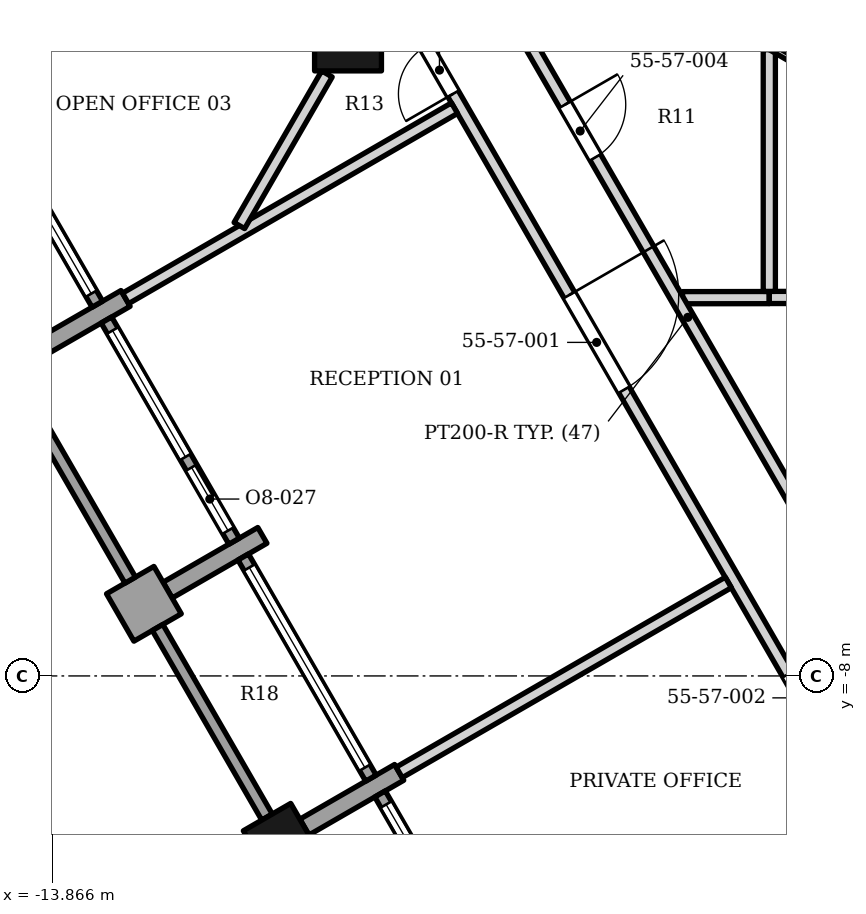
"""IFC4 building model, lengths in metres.
Left out: names, types, materials, properties, quantities, classifications, styles, units other than length and angle.
Written with IfcOpenShell. Run it as: python <this file> out.ifc"""

import sys

from ifc_helpers import new_model, si_unit, direction, frame, frame_2d, origin, origin_2d, place, context, subcontext, project, spatial, rectangle, extrude, element, fill, save


model = new_model("IFC4")
c1 = context("Model", 3, precision=1e-05, world=origin(), true_north=direction((0.0, 1.0)))
c2 = subcontext(c1, "Body", "Model", "MODEL_VIEW")
j1 = project(units=[si_unit("LENGTHUNIT", "METRE"), si_unit("PLANEANGLEUNIT", "RADIAN")], contexts=[c1])
p1 = place(None, origin())
s1 = spatial("IfcSite", under=j1, at=p1, CompositionType="ELEMENT")
p2 = place(p1, origin())
s2 = spatial("IfcBuilding", under=s1, at=p2, CompositionType="ELEMENT")
p3 = place(p2, frame((0.0, 0.0, 231.5)))
s3 = spatial("IfcBuildingStorey", under=s2, at=p3, CompositionType="ELEMENT", Elevation=231.5)
p4 = place(p3, frame((-9.0, 2.5, 0.0), z_axis=(0.0, 0.0, 1.0), x_axis=(1.0, 0.0, 0.0)))
e1 = element("IfcColumn", 1, at=p4, inside=s3, PredefinedType="COLUMN", context=c2, shape_type="SweptSolid", body=[
    extrude(rectangle(XDim=1.1, YDim=1.1, at=origin_2d()), origin(), (0.0, 0.0, 1.0), 3.9),
])
p5 = place(p3, frame((-10.107, -10.711, 0.0), z_axis=(0.0, 0.0, 1.0), x_axis=(0.5, -0.866025403784, 0.0)))
e2 = element("IfcColumn", 2, at=p5, inside=s3, PredefinedType="COLUMN", context=c2, shape_type="SweptSolid", body=[
    extrude(rectangle(XDim=0.9, YDim=0.9, at=origin_2d()), origin(), (0.0, 0.0, 1.0), 3.9),
])
p6 = place(p3, frame((-14.217, -2.692, 0.0), z_axis=(0.0, 0.0, 1.0), x_axis=(0.866047807691, 0.499961193289, 0.0)))
e3 = element("IfcWall", 3, at=p6, inside=s3, PredefinedType="SOLIDWALL", context=c2, shape_type="SweptSolid", body=[
    extrude(rectangle(XDim=1.8, YDim=0.3, at=frame_2d((0.9, 0.0))), origin(), (0.0, 0.0, 1.0), 3.0),
])
p7 = place(p3, frame((-12.582, -6.424, 0.0), z_axis=(0.0, 0.0, 1.0), x_axis=(0.499902469156, -0.866081705922, 0.0)))
e4 = element("IfcWall", 4, at=p7, inside=s3, PredefinedType="SOLIDWALL", context=c2, shape_type="SweptSolid", body=[
    extrude(rectangle(XDim=0.9, YDim=0.9, at=frame_2d((0.45, 0.0))), origin(), (0.0, 0.0, 1.0), 3.0),
])
p8 = place(p3, frame((-11.967, -6.589, 0.0), z_axis=(0.0, 0.0, 1.0), x_axis=(0.865989075817, 0.500062916607, 0.0)))
e5 = element("IfcWall", 5, at=p8, inside=s3, PredefinedType="SOLIDWALL", context=c2, shape_type="SweptSolid", body=[
    extrude(rectangle(XDim=1.8, YDim=0.3, at=frame_2d((0.9, 0.0))), origin(), (0.0, 0.0, 1.0), 2.974),
])
p9 = place(p3, frame((-9.717, -10.486, 0.0), z_axis=(0.0, 0.0, 1.0), x_axis=(0.866047807691, 0.499961193289, 0.0)))
e6 = element("IfcWall", 6, at=p9, inside=s3, PredefinedType="SOLIDWALL", context=c2, shape_type="SweptSolid", body=[
    extrude(rectangle(XDim=1.8, YDim=0.3, at=frame_2d((0.9, 0.0))), origin(), (0.0, 0.0, 1.0), 2.884),
])
p10 = place(p3, frame((-15.223, 1.75, 0.0), z_axis=(0.0, 0.0, 1.0), x_axis=(0.500027713859, -0.866009402589, 0.0)))
e7 = element("IfcWall", 7, at=p10, inside=s3, PredefinedType="ELEMENTEDWALL", context=c2, shape_type="SweptSolid", body=[
    extrude(rectangle(XDim=4.2, YDim=0.2, at=frame_2d((2.1, 0.0))), origin(), (0.0, 0.0, 1.0), 3.0),
])
p11 = place(p10, frame((0.2, 0.0, 0.45)))
e8 = element("IfcOpeningElement", 8, at=p11, cuts=e7, PredefinedType="OPENING", context=c2, shape_type="SweptSolid", body=[
    extrude(rectangle(XDim=3.8, YDim=2.25, at=frame_2d((1.9, 1.125))), frame((0.0, 0.11, 0.0), z_axis=(0.0, -1.0, 0.0), x_axis=(1.0, 0.0, 0.0)), (0.0, 0.0, 1.0), 0.22),
])
p12 = place(p3, frame((-14.382, -3.306, 0.0), z_axis=(0.0, 0.0, 1.0), x_axis=(0.500012057535, -0.866018442252, 0.0)))
e9 = element("IfcWall", 9, at=p12, inside=s3, PredefinedType="SOLIDWALL", context=c2, shape_type="SweptSolid", body=[
    extrude(rectangle(XDim=3.6, YDim=0.2, at=frame_2d((1.8, 0.0))), origin(), (0.0, 0.0, 1.0), 3.0),
])
p13 = place(p3, frame((-12.973, -2.146, 0.0), z_axis=(0.0, 0.0, 1.0), x_axis=(0.500002543286, -0.866023935413, 0.0)))
e10 = element("IfcWall", 10, at=p13, inside=s3, PredefinedType="ELEMENTEDWALL", context=c2, shape_type="SweptSolid", body=[
    extrude(rectangle(XDim=4.2, YDim=0.2, at=frame_2d((2.1, 0.0))), origin(), (0.0, 0.0, 1.0), 2.974),
])
p14 = place(p13, frame((0.2, 0.0, 0.45)))
e11 = element("IfcOpeningElement", 11, at=p14, cuts=e10, PredefinedType="OPENING", context=c2, shape_type="SweptSolid", body=[
    extrude(rectangle(XDim=2.4, YDim=2.25, at=frame_2d((1.2, 1.125))), frame((0.0, 0.11, 0.0), z_axis=(0.0, -1.0, 0.0), x_axis=(1.0, 0.0, 0.0)), (0.0, 0.0, 1.0), 0.22),
])
p15 = place(p13, frame((2.8, 0.0, 0.0)))
e12 = element("IfcOpeningElement", 12, at=p15, cuts=e10, PredefinedType="OPENING", context=c2, shape_type="SweptSolid", body=[
    extrude(rectangle(XDim=1.2, YDim=2.7, at=frame_2d((0.6, 1.35))), frame((0.0, 0.11, 0.0), z_axis=(0.0, -1.0, 0.0), x_axis=(1.0, 0.0, 0.0)), (0.0, 0.0, 1.0), 0.22),
])
p16 = place(p3, frame((-12.132, -7.204, 0.0), z_axis=(0.0, 0.0, 1.0), x_axis=(0.500012057535, -0.866018442252, 0.0)))
e13 = element("IfcWall", 13, at=p16, inside=s3, PredefinedType="SOLIDWALL", context=c2, shape_type="SweptSolid", body=[
    extrude(rectangle(XDim=3.6, YDim=0.2, at=frame_2d((1.8, 0.0))), origin(), (0.0, 0.0, 1.0), 3.0),
])
p17 = place(p3, frame((-10.723, -6.044, 0.0), z_axis=(0.0, 0.0, 1.0), x_axis=(0.500027713859, -0.866009402589, 0.0)))
e14 = element("IfcWall", 14, at=p17, inside=s3, PredefinedType="ELEMENTEDWALL", context=c2, shape_type="SweptSolid", body=[
    extrude(rectangle(XDim=4.2, YDim=0.2, at=frame_2d((2.1, 0.0))), origin(), (0.0, 0.0, 1.0), 2.884),
])
p18 = place(p17, frame((0.2, 0.0, 0.45)))
e15 = element("IfcOpeningElement", 15, at=p18, cuts=e14, PredefinedType="OPENING", context=c2, shape_type="SweptSolid", body=[
    extrude(rectangle(XDim=3.8, YDim=2.25, at=frame_2d((1.9, 1.125))), frame((0.0, 0.11, 0.0), z_axis=(0.0, -1.0, 0.0), x_axis=(1.0, 0.0, 0.0)), (0.0, 0.0, 1.0), 0.22),
])
p19 = place(p3, frame((-8.473, -9.941, 0.0), z_axis=(0.0, 0.0, 1.0), x_axis=(0.500027713859, -0.866009402589, 0.0)))
e16 = element("IfcWall", 16, at=p19, inside=s3, PredefinedType="ELEMENTEDWALL", context=c2, shape_type="SweptSolid", body=[
    extrude(rectangle(XDim=4.2, YDim=0.2, at=frame_2d((2.1, 0.0))), origin(), (0.0, 0.0, 1.0), 2.95),
])
p20 = place(p19, frame((0.2, 0.0, 0.45)))
e17 = element("IfcOpeningElement", 17, at=p20, cuts=e16, PredefinedType="OPENING", context=c2, shape_type="SweptSolid", body=[
    extrude(rectangle(XDim=2.4, YDim=2.25, at=frame_2d((1.2, 1.125))), frame((0.0, 0.11, 0.0), z_axis=(0.0, -1.0, 0.0), x_axis=(1.0, 0.0, 0.0)), (0.0, 0.0, 1.0), 0.22),
])
p21 = place(p19, frame((2.8, 0.0, 0.0)))
e18 = element("IfcOpeningElement", 18, at=p21, cuts=e16, PredefinedType="OPENING", context=c2, shape_type="SweptSolid", body=[
    extrude(rectangle(XDim=1.2, YDim=2.7, at=frame_2d((0.6, 1.35))), frame((0.0, 0.11, 0.0), z_axis=(0.0, -1.0, 0.0), x_axis=(1.0, 0.0, 0.0)), (0.0, 0.0, 1.0), 0.22),
])
p22 = place(p3, frame((-5.908, -13.483, 0.0), z_axis=(0.0, 0.0, 1.0), x_axis=(0.866160870949, 0.499765290549, 0.0)))
e19 = element("IfcWall", 19, at=p22, inside=s3, PredefinedType="PARTITIONING", context=c2, shape_type="SweptSolid", body=[
    extrude(rectangle(XDim=6.25, YDim=0.2, at=frame_2d((3.125, 0.0))), origin(), (0.0, 0.0, 1.0), 2.742),
])
p23 = place(p3, frame((-8.403, 3.534, 0.0), z_axis=(0.0, 0.0, 1.0), x_axis=(0.499994899308, -0.86602834865, 0.0)))
e20 = element("IfcWall", 20, at=p23, inside=s3, PredefinedType="PARTITIONING", context=c2, shape_type="SweptSolid", body=[
    extrude(rectangle(XDim=16.677, YDim=0.2, at=frame_2d((8.339, 0.0))), origin(), (0.0, 0.0, 1.0), 2.742),
])
p24 = place(p23, frame((6.084, 0.0, 0.0)))
e21 = element("IfcOpeningElement", 21, at=p24, cuts=e20, PredefinedType="OPENING", context=c2, shape_type="SweptSolid", body=[
    extrude(rectangle(XDim=1.8, YDim=2.4, at=frame_2d((0.9, 1.2))), frame((0.0, 0.11, 0.0), z_axis=(0.0, -1.0, 0.0), x_axis=(1.0, 0.0, 0.0)), (0.0, 0.0, 1.0), 0.22),
])
p25 = place(p23, frame((13.285, 0.0, 0.0)))
e22 = element("IfcOpeningElement", 22, at=p25, cuts=e20, PredefinedType="OPENING", context=c2, shape_type="SweptSolid", body=[
    extrude(rectangle(XDim=0.9, YDim=2.1, at=frame_2d((0.45, 1.05))), frame((0.0, 0.11, 0.0), z_axis=(0.0, -1.0, 0.0), x_axis=(1.0, 0.0, 0.0)), (0.0, 0.0, 1.0), 0.22),
])
p26 = place(p23, frame((1.364, 0.0, 0.0)))
e23 = element("IfcOpeningElement", 23, at=p26, cuts=e20, PredefinedType="OPENING", context=c2, shape_type="SweptSolid", body=[
    extrude(rectangle(XDim=0.9, YDim=2.1, at=frame_2d((0.45, 1.05))), frame((0.0, 0.11, 0.0), z_axis=(0.0, -1.0, 0.0), x_axis=(1.0, 0.0, 0.0)), (0.0, 0.0, 1.0), 0.22),
])
p27 = place(p3, frame((-8.158, -9.586, 0.0), z_axis=(0.0, 0.0, 1.0), x_axis=(0.866153717883, 0.499777687575, 0.0)))
e24 = element("IfcWall", 24, at=p27, inside=s3, PredefinedType="PARTITIONING", context=c2, shape_type="SweptSolid", body=[
    extrude(rectangle(XDim=6.25, YDim=0.2, at=frame_2d((3.125, 0.0))), origin(), (0.0, 0.0, 1.0), 2.742),
])
p28 = place(p3, frame((-12.659, -1.791, 0.0), z_axis=(0.0, 0.0, 1.0), x_axis=(0.865661558062, 0.500629670408, 0.0)))
e25 = element("IfcWall", 25, at=p28, inside=s3, PredefinedType="PARTITIONING", context=c2, shape_type="SweptSolid", body=[
    extrude(rectangle(XDim=6.25, YDim=0.2, at=frame_2d((3.125, 0.0))), origin(), (0.0, 0.0, 1.0), 2.884),
])
p29 = place(p3, frame((-3.499, -1.78, 0.0), z_axis=(0.0, 0.0, 1.0), x_axis=(0.999999471866, 0.001027748686, 0.0)))
e26 = element("IfcWall", 26, at=p29, inside=s3, PredefinedType="PARTITIONING", context=c2, shape_type="SweptSolid", body=[
    extrude(rectangle(XDim=1.425, YDim=0.2, at=frame_2d((0.713, 0.0))), origin(), (0.0, 0.0, 1.0), 3.73),
])
p30 = place(p3, frame((-2.071, -1.776, 0.0), z_axis=(0.0, 0.0, 1.0), x_axis=(1.0, 0.0, 0.0)))
e27 = element("IfcWall", 27, at=p30, inside=s3, PredefinedType="PARTITIONING", context=c2, shape_type="SweptSolid", body=[
    extrude(rectangle(XDim=5.448, YDim=0.2, at=frame_2d((2.724, 0.0))), origin(), (0.0, 0.0, 1.0), 2.742),
])
p31 = place(p3, frame((-10.787, -0.594, 0.0), z_axis=(0.0, 0.0, 1.0), x_axis=(0.500287485194, 0.865859360496, 0.0)))
e28 = element("IfcWall", 28, at=p31, inside=s3, PredefinedType="PARTITIONING", context=c2, shape_type="SweptSolid", body=[
    extrude(rectangle(XDim=2.88, YDim=0.2, at=frame_2d((1.44, 0.0))), origin(), (0.0, 0.0, 1.0), 3.73),
])
p32 = place(p3, frame((-2.071, -1.676, 0.0), z_axis=(0.0, 0.0, 1.0), x_axis=(0.0, 1.0, 0.0)))
e29 = element("IfcWall", 29, at=p32, inside=s3, PredefinedType="PARTITIONING", context=c2, shape_type="SweptSolid", body=[
    extrude(rectangle(XDim=3.975, YDim=0.2, at=frame_2d((1.987, 0.0))), origin(), (0.0, 0.0, 1.0), 2.742),
])
p33 = place(p3, frame((-2.073, 2.357, 0.0), z_axis=(0.0, 0.0, 1.0), x_axis=(0.865852787501, -0.500298861059, 0.0)))
e30 = element("IfcWall", 30, at=p33, inside=s3, PredefinedType="PARTITIONING", context=c2, shape_type="SweptSolid", body=[
    extrude(rectangle(XDim=4.974, YDim=0.1, at=frame_2d((2.487, 0.0))), origin(), (0.0, 0.0, 1.0), 2.742),
])
p34 = place(p3, frame((-6.764, 3.7, 0.0), z_axis=(0.0, 0.0, 1.0), x_axis=(0.500260603275, -0.865874892124, 0.0)))
e31 = element("IfcWall", 31, at=p34, inside=s3, PredefinedType="PARTITIONING", context=c2, shape_type="SweptSolid", body=[
    extrude(rectangle(XDim=13.403, YDim=0.2, at=frame_2d((6.702, 0.0))), origin(), (0.0, 0.0, 1.0), 2.742),
])
p35 = place(p34, frame((2.663, 0.0, 0.0)))
e32 = element("IfcOpeningElement", 32, at=p35, cuts=e31, PredefinedType="OPENING", context=c2, shape_type="SweptSolid", body=[
    extrude(rectangle(XDim=1.0, YDim=2.1, at=frame_2d((0.5, 1.05))), frame((0.0, 0.11, 0.0), z_axis=(0.0, -1.0, 0.0), x_axis=(1.0, 0.0, 0.0)), (0.0, 0.0, 1.0), 0.22),
])
p36 = place(p11, origin())
e33 = element("IfcWindow", 33, at=p36, inside=s3, PartitioningType="SINGLE_PANEL", PredefinedType="WINDOW", context=c2, shape_type="SweptSolid", body=[
    extrude(rectangle(XDim=3.8, YDim=2.25, at=frame_2d((1.9, 1.125))), frame((0.0, 0.03, 0.0), z_axis=(0.0, -1.0, 0.0), x_axis=(1.0, 0.0, 0.0)), (0.0, 0.0, 1.0), 0.06),
])
fill(e8, e33)
p37 = place(p14, origin())
e34 = element("IfcWindow", 34, at=p37, inside=s3, PartitioningType="SINGLE_PANEL", PredefinedType="WINDOW", context=c2, shape_type="SweptSolid", body=[
    extrude(rectangle(XDim=2.4, YDim=2.25, at=frame_2d((1.2, 1.125))), frame((0.0, 0.03, 0.0), z_axis=(0.0, -1.0, 0.0), x_axis=(1.0, 0.0, 0.0)), (0.0, 0.0, 1.0), 0.06),
])
fill(e11, e34)
p38 = place(p15, origin())
e35 = element("IfcDoor", 35, at=p38, inside=s3, OperationType="SINGLE_SWING_LEFT", PredefinedType="DOOR", context=c2, shape_type="SweptSolid", body=[
    extrude(rectangle(XDim=1.2, YDim=2.7, at=frame_2d((0.6, 1.35))), frame((0.0, 0.025, 0.0), z_axis=(0.0, -1.0, 0.0), x_axis=(1.0, 0.0, 0.0)), (0.0, 0.0, 1.0), 0.05),
])
fill(e12, e35)
p39 = place(p18, origin())
e36 = element("IfcWindow", 36, at=p39, inside=s3, PartitioningType="SINGLE_PANEL", PredefinedType="WINDOW", context=c2, shape_type="SweptSolid", body=[
    extrude(rectangle(XDim=3.8, YDim=2.25, at=frame_2d((1.9, 1.125))), frame((0.0, 0.03, 0.0), z_axis=(0.0, -1.0, 0.0), x_axis=(1.0, 0.0, 0.0)), (0.0, 0.0, 1.0), 0.06),
])
fill(e15, e36)
p40 = place(p20, origin())
e37 = element("IfcWindow", 37, at=p40, inside=s3, PartitioningType="SINGLE_PANEL", PredefinedType="WINDOW", context=c2, shape_type="SweptSolid", body=[
    extrude(rectangle(XDim=2.4, YDim=2.25, at=frame_2d((1.2, 1.125))), frame((0.0, 0.03, 0.0), z_axis=(0.0, -1.0, 0.0), x_axis=(1.0, 0.0, 0.0)), (0.0, 0.0, 1.0), 0.06),
])
fill(e17, e37)
p41 = place(p24, origin())
e38 = element("IfcDoor", 38, at=p41, inside=s3, OperationType="DOUBLE_DOOR_SINGLE_SWING", PredefinedType="DOOR", context=c2, shape_type="SweptSolid", body=[
    extrude(rectangle(XDim=1.8, YDim=2.4, at=frame_2d((0.9, 1.2))), frame((0.0, 0.025, 0.0), z_axis=(0.0, -1.0, 0.0), x_axis=(1.0, 0.0, 0.0)), (0.0, 0.0, 1.0), 0.05),
])
fill(e21, e38)
p42 = place(p35, origin())
e39 = element("IfcDoor", 39, at=p42, inside=s3, OperationType="SINGLE_SWING_LEFT", PredefinedType="DOOR", context=c2, shape_type="SweptSolid", body=[
    extrude(rectangle(XDim=1.0, YDim=2.1, at=frame_2d((0.5, 1.05))), frame((0.0, 0.025, 0.0), z_axis=(0.0, -1.0, 0.0), x_axis=(1.0, 0.0, 0.0)), (0.0, 0.0, 1.0), 0.05),
])
fill(e32, e39)
p43 = place(p26, origin())
e40 = element("IfcDoor", 40, at=p43, inside=s3, OperationType="SINGLE_SWING_RIGHT", PredefinedType="DOOR", context=c2, shape_type="SweptSolid", body=[
    extrude(rectangle(XDim=0.9, YDim=2.1, at=frame_2d((0.45, 1.05))), frame((0.0, 0.025, 0.0), z_axis=(0.0, -1.0, 0.0), x_axis=(1.0, 0.0, 0.0)), (0.0, 0.0, 1.0), 0.05),
])
fill(e23, e40)
save(model, sys.argv[1])
